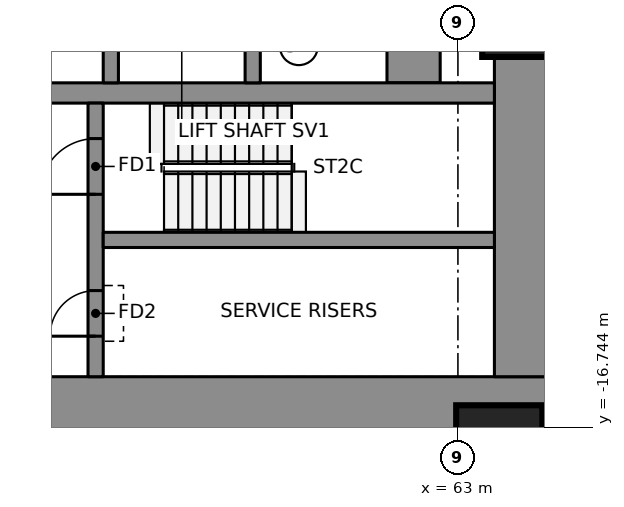
"""IFC4 building model, lengths in metres.
Left out: names, types, materials, properties, quantities, classifications, styles, units other than length and angle.
Written with IfcOpenShell. Run it as: python <this file> out.ifc"""

import sys

from ifc_helpers import new_model, si_unit, direction, frame, frame_2d, origin, origin_2d, place, context, subcontext, project, spatial, rectangle, extrude, element, fill, save


model = new_model("IFC4")
c1 = context("Model", 3, precision=1e-05, world=origin(), true_north=direction((0.0, 1.0)))
c2 = subcontext(c1, "Body", "Model", "MODEL_VIEW")
j1 = project(units=[si_unit("LENGTHUNIT", "METRE"), si_unit("PLANEANGLEUNIT", "RADIAN")], contexts=[c1])
p1 = place(None, origin())
s1 = spatial("IfcSite", under=j1, at=p1, CompositionType="ELEMENT")
p2 = place(p1, origin())
s2 = spatial("IfcBuilding", under=s1, at=p2, CompositionType="ELEMENT")
p3 = place(p2, frame((0.0, 0.0, 116.85)))
s3 = spatial("IfcBuildingStorey", under=s2, at=p3, CompositionType="ELEMENT", Elevation=116.85)
p4 = place(p3, frame((50.7, -16.275, 0.0), z_axis=(0.0, 0.0, 1.0), x_axis=(1.0, 0.0, 0.0)))
e1 = element("IfcWall", 1, at=p4, inside=s3, PredefinedType="SHEAR", context=c2, shape_type="SweptSolid", body=[
    extrude(rectangle(XDim=14.07, YDim=1.05, at=frame_2d((7.035, 0.0))), origin(), (0.0, 0.0, 1.0), 3.55),
])
p5 = place(p3, frame((64.245, -15.75, 0.0), z_axis=(0.0, 0.0, 1.0), x_axis=(0.0, 1.0, 0.0)))
e2 = element("IfcWall", 2, at=p5, inside=s3, PredefinedType="SHEAR", context=c2, shape_type="SweptSolid", body=[
    extrude(rectangle(XDim=6.361, YDim=1.05, at=frame_2d((3.181, 0.0))), origin(), (0.0, 0.0, 1.0), 3.55),
])
p6 = place(p3, frame((62.125, -9.95, 0.0), z_axis=(0.0, 0.0, 1.0), x_axis=(0.0, 1.0, 0.0)))
e3 = element("IfcWall", 3, at=p6, inside=s3, PredefinedType="SHEAR", context=c2, shape_type="SweptSolid", body=[
    extrude(rectangle(XDim=19.9, YDim=1.05, at=frame_2d((9.95, 0.0))), origin(), (0.0, 0.0, 1.0), 3.55),
])
p7 = place(p3, frame((50.7, -10.15, 0.0), z_axis=(0.0, 0.0, 1.0), x_axis=(1.0, 0.0, 0.0)))
e4 = element("IfcWall", 4, at=p7, inside=s3, PredefinedType="SHEAR", context=c2, shape_type="SweptSolid", body=[
    extrude(rectangle(XDim=13.02, YDim=0.4, at=frame_2d((6.51, 0.0))), origin(), (0.0, 0.0, 1.0), 3.55),
])
for number, where, z_axis, x_axis in (
    (5, (56.15, -9.95, 0.0), (0.0, 0.0, 1.0), (0.0, 1.0, 0.0)),
    (6, (58.95, -9.95, 0.0), (0.0, 0.0, 1.0), (0.0, 1.0, 0.0)),
):
    element("IfcWall", number, at=place(p3, frame(where, z_axis=z_axis, x_axis=x_axis)), inside=s3, PredefinedType="SHEAR", context=c2, shape_type="SweptSolid", body=[
        extrude(rectangle(XDim=3.0, YDim=0.3, at=frame_2d((1.5, 0.0))), origin(), (0.0, 0.0, 1.0), 3.55),
    ])
p8 = place(p3, frame((55.85, -15.75, 0.0), z_axis=(0.0, 0.0, 1.0), x_axis=(0.0, 1.0, 0.0)))
e7 = element("IfcWall", 7, at=p8, inside=s3, PredefinedType="SHEAR", context=c2, shape_type="SweptSolid", body=[
    extrude(rectangle(XDim=5.4, YDim=0.3, at=frame_2d((2.7, 0.0))), origin(), (0.0, 0.0, 1.0), 3.55),
])
p9 = place(p8, frame((3.6, 0.0, 0.0)))
e8 = element("IfcOpeningElement", 8, at=p9, cuts=e7, PredefinedType="OPENING", context=c2, shape_type="SweptSolid", body=[
    extrude(rectangle(XDim=1.1, YDim=2.1, at=frame_2d((0.55, 1.05))), frame((0.0, 0.16, 0.0), z_axis=(0.0, -1.0, 0.0), x_axis=(1.0, 0.0, 0.0)), (0.0, 0.0, 1.0), 0.32),
])
p10 = place(p8, frame((0.8, 0.0, 0.0)))
e9 = element("IfcOpeningElement", 9, at=p10, cuts=e7, PredefinedType="OPENING", context=c2, shape_type="SweptSolid", body=[
    extrude(rectangle(XDim=0.9, YDim=2.1, at=frame_2d((0.45, 1.05))), frame((0.0, 0.16, 0.0), z_axis=(0.0, -1.0, 0.0), x_axis=(1.0, 0.0, 0.0)), (0.0, 0.0, 1.0), 0.32),
])
p11 = place(p3, frame((56.0, -13.05, 0.0), z_axis=(0.0, 0.0, 1.0), x_axis=(1.0, 0.0, 0.0)))
e10 = element("IfcWall", 10, at=p11, inside=s3, PredefinedType="SHEAR", context=c2, shape_type="SweptSolid", body=[
    extrude(rectangle(XDim=7.72, YDim=0.3, at=frame_2d((3.86, 0.0))), origin(), (0.0, 0.0, 1.0), 3.55),
])
for number, where, z_axis, x_axis in (
    (11, (63.816, -17.164, 0.0), (0.0, 0.0, 1.0), (1.0, 0.0, 0.0)),
    (12, (64.329, -8.589, 0.0), (0.0, 0.0, 1.0), (1.0, 0.0, 0.0)),
):
    element("IfcColumn", number, at=place(p3, frame(where, z_axis=z_axis, x_axis=x_axis)), inside=s3, PredefinedType="COLUMN", context=c2, shape_type="SweptSolid", body=[
        extrude(rectangle(XDim=1.7, YDim=1.7, at=origin_2d()), origin(), (0.0, 0.0, 1.0), 3.55),
    ])
p12 = place(p9, origin())
e13 = element("IfcDoor", 13, at=p12, inside=s3, OperationType="SINGLE_SWING_RIGHT", PredefinedType="DOOR", context=c2, shape_type="SweptSolid", body=[
    extrude(rectangle(XDim=1.1, YDim=2.1, at=frame_2d((0.55, 1.05))), frame((0.0, 0.025, 0.0), z_axis=(0.0, -1.0, 0.0), x_axis=(1.0, 0.0, 0.0)), (0.0, 0.0, 1.0), 0.05),
])
fill(e8, e13)
p13 = place(p10, origin())
e14 = element("IfcDoor", 14, at=p13, inside=s3, OperationType="SINGLE_SWING_LEFT", PredefinedType="DOOR", context=c2, shape_type="SweptSolid", body=[
    extrude(rectangle(XDim=0.9, YDim=2.1, at=frame_2d((0.45, 1.05))), frame((0.0, 0.025, 0.0), z_axis=(0.0, -1.0, 0.0), x_axis=(1.0, 0.0, 0.0)), (0.0, 0.0, 1.0), 0.05),
])
fill(e9, e14)
save(model, sys.argv[1])
